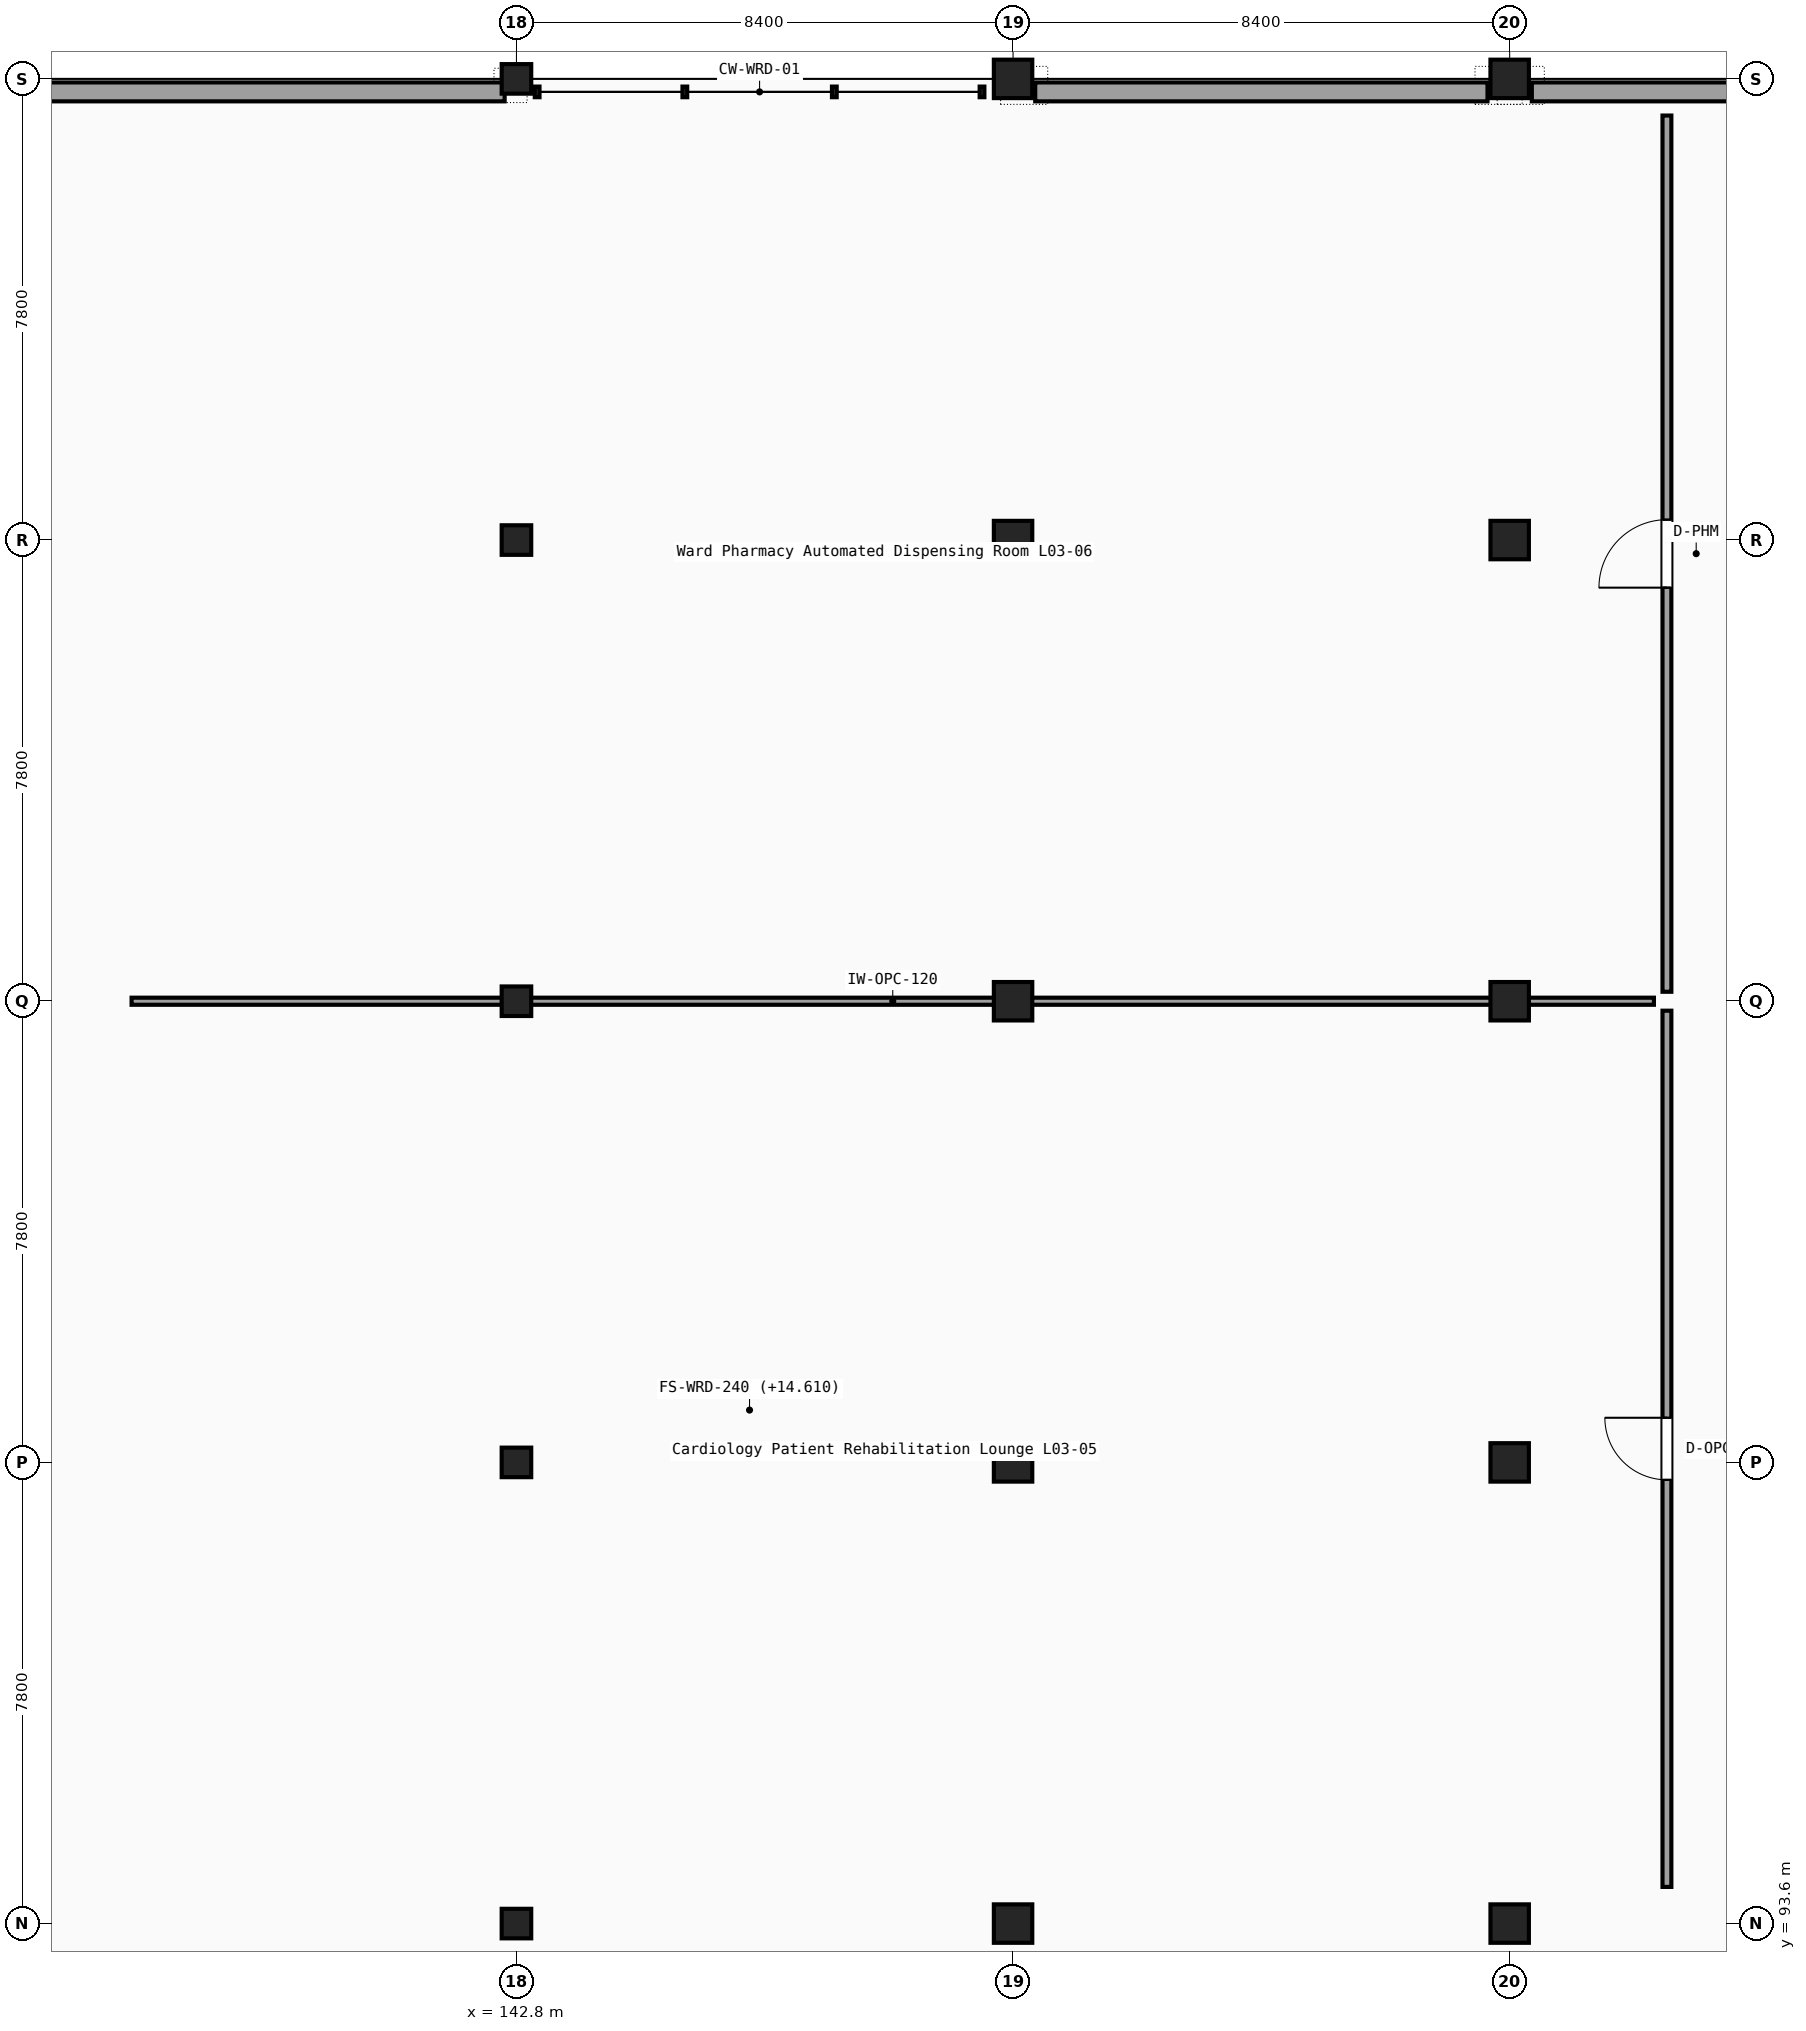
"""IFC4 building model, lengths in metres.
Left out: names, types, materials, properties, quantities, classifications, styles, units other than length and angle.
Written with IfcOpenShell. Run it as: python <this file> out.ifc"""

import sys

from ifc_helpers import new_model, si_unit, direction, frame, frame_2d, origin, origin_2d, place, context, subcontext, project, spatial, rectangle, i_section, extrude, element, fill, save


model = new_model("IFC4")
c1 = context("Model", 3, precision=1e-05, world=origin(), true_north=direction((0.0, 1.0)))
c2 = subcontext(c1, "Body", "Model", "MODEL_VIEW")
j1 = project(units=[si_unit("LENGTHUNIT", "METRE"), si_unit("PLANEANGLEUNIT", "RADIAN")], contexts=[c1])
p1 = place(None, origin())
s1 = spatial("IfcSite", under=j1, at=p1, CompositionType="ELEMENT")
p2 = place(p1, origin())
s2 = spatial("IfcBuilding", under=s1, at=p2, CompositionType="ELEMENT")
p3 = place(p2, frame((0.0, 0.0, 14.85)))
s3 = spatial("IfcBuildingStorey", under=s2, at=p3, CompositionType="ELEMENT", Elevation=14.85)
for number, where, z_axis, x_axis in (
    (1, (142.8, 93.6, 0.0), (0.0, 0.0, 1.0), (1.0, 0.0, 0.0)),
    (2, (142.8, 101.4, 0.0), (0.0, 0.0, 1.0), (1.0, 0.0, 0.0)),
    (3, (142.8, 109.2, 0.0), (0.0, 0.0, 1.0), (1.0, 0.0, 0.0)),
    (4, (142.8, 117.0, 0.0), (0.0, 0.0, 1.0), (1.0, 0.0, 0.0)),
    (5, (142.8, 124.8, 0.0), (0.0, 0.0, 1.0), (1.0, 0.0, 0.0)),
):
    element("IfcColumn", number, at=place(p3, frame(where, z_axis=z_axis, x_axis=x_axis)), inside=s3, PredefinedType="COLUMN", context=c2, shape_type="SweptSolid", body=[
        extrude(i_section(OverallWidth=0.3, OverallDepth=0.5, WebThickness=0.014, FlangeThickness=0.028, FilletRadius=0.027, at=origin_2d()), origin(), (0.0, 0.0, 1.0), 4.05),
    ])
for number, where, z_axis, x_axis in (
    (6, (151.2, 93.6, 0.0), (0.0, 0.0, 1.0), (1.0, 0.0, 0.0)),
    (7, (151.2, 101.4, 0.0), (0.0, 0.0, 1.0), (1.0, 0.0, 0.0)),
    (8, (151.2, 109.2, 0.0), (0.0, 0.0, 1.0), (1.0, 0.0, 0.0)),
    (9, (151.2, 117.0, 0.0), (0.0, 0.0, 1.0), (1.0, 0.0, 0.0)),
    (10, (151.2, 124.8, 0.0), (0.0, 0.0, 1.0), (1.0, 0.0, 0.0)),
    (11, (159.6, 93.6, 0.0), (0.0, 0.0, 1.0), (1.0, 0.0, 0.0)),
    (12, (159.6, 101.4, 0.0), (0.0, 0.0, 1.0), (1.0, 0.0, 0.0)),
    (13, (159.6, 109.2, 0.0), (0.0, 0.0, 1.0), (1.0, 0.0, 0.0)),
    (14, (159.6, 117.0, 0.0), (0.0, 0.0, 1.0), (1.0, 0.0, 0.0)),
    (15, (159.6, 124.8, 0.0), (0.0, 0.0, 1.0), (1.0, 0.0, 0.0)),
):
    element("IfcColumn", number, at=place(p3, frame(where, z_axis=z_axis, x_axis=x_axis)), inside=s3, PredefinedType="COLUMN", context=c2, shape_type="SweptSolid", body=[
        extrude(rectangle(XDim=0.65, YDim=0.65, at=origin_2d()), origin(), (0.0, 0.0, 1.0), 4.05),
    ])
p4 = place(p3, frame((134.6, 124.58, 0.0), z_axis=(0.0, 0.0, 1.0), x_axis=(1.0, 0.0, 0.0)))
e16 = element("IfcWall", 16, at=p4, inside=s3, PredefinedType="SOLIDWALL", context=c2, shape_type="SweptSolid", body=[
    extrude(rectangle(XDim=8.0, YDim=0.32, at=frame_2d((4.0, 0.0))), origin(), (0.0, 0.0, 1.0), 3.45),
])
p5 = place(p3, frame((151.575, 124.58, 0.0), z_axis=(0.0, 0.0, 1.0), x_axis=(1.0, 0.0, 0.0)))
e17 = element("IfcWall", 17, at=p5, inside=s3, PredefinedType="SOLIDWALL", context=c2, shape_type="SweptSolid", body=[
    extrude(rectangle(XDim=7.65, YDim=0.32, at=frame_2d((3.825, 0.0))), origin(), (0.0, 0.0, 1.0), 3.45),
])
p6 = place(p3, frame((159.975, 124.58, 0.0), z_axis=(0.0, 0.0, 1.0), x_axis=(1.0, 0.0, 0.0)))
e18 = element("IfcWall", 18, at=p6, inside=s3, PredefinedType="SOLIDWALL", context=c2, shape_type="SweptSolid", body=[
    extrude(rectangle(XDim=7.825, YDim=0.32, at=frame_2d((3.913, 0.0))), origin(), (0.0, 0.0, 1.0), 3.45),
])
p7 = place(p6, frame((3.337, 0.0, 0.7)))
e19 = element("IfcOpeningElement", 19, at=p7, cuts=e18, PredefinedType="OPENING", context=c2, shape_type="SweptSolid", body=[
    extrude(rectangle(XDim=1.15, YDim=1.95, at=frame_2d((0.575, 0.975))), frame((0.0, 0.17, 0.0), z_axis=(0.0, -1.0, 0.0), x_axis=(1.0, 0.0, 0.0)), (0.0, 0.0, 1.0), 0.34),
])
p8 = place(p3, frame((162.26, 94.22, 0.0), z_axis=(0.0, 0.0, 1.0), x_axis=(0.0, 1.0, 0.0)))
e20 = element("IfcWall", 20, at=p8, inside=s3, PredefinedType="PARTITIONING", context=c2, shape_type="SweptSolid", body=[
    extrude(rectangle(XDim=14.82, YDim=0.15, at=frame_2d((7.41, 0.0))), origin(), (0.0, 0.0, 1.0), 3.35),
])
p9 = place(p8, frame((6.885, 0.0, 0.0)))
e21 = element("IfcOpeningElement", 21, at=p9, cuts=e20, PredefinedType="OPENING", context=c2, shape_type="SweptSolid", body=[
    extrude(rectangle(XDim=1.05, YDim=2.15, at=frame_2d((0.525, 1.075))), frame((0.0, 0.085, 0.0), z_axis=(0.0, -1.0, 0.0), x_axis=(1.0, 0.0, 0.0)), (0.0, 0.0, 1.0), 0.17),
])
p10 = place(p3, frame((136.29, 109.2, 0.0), z_axis=(0.0, 0.0, 1.0), x_axis=(1.0, 0.0, 0.0)))
e22 = element("IfcWall", 22, at=p10, inside=s3, PredefinedType="PARTITIONING", context=c2, shape_type="SweptSolid", body=[
    extrude(rectangle(XDim=25.75, YDim=0.12, at=frame_2d((12.875, 0.0))), origin(), (0.0, 0.0, 1.0), 3.35),
])
p11 = place(p3, frame((162.26, 109.36, 0.0), z_axis=(0.0, 0.0, 1.0), x_axis=(0.0, 1.0, 0.0)))
e23 = element("IfcWall", 23, at=p11, inside=s3, PredefinedType="PARTITIONING", context=c2, shape_type="SweptSolid", body=[
    extrude(rectangle(XDim=14.82, YDim=0.15, at=frame_2d((7.41, 0.0))), origin(), (0.0, 0.0, 1.0), 3.35),
])
p12 = place(p11, frame((6.835, 0.0, 0.0)))
e24 = element("IfcOpeningElement", 24, at=p12, cuts=e23, PredefinedType="OPENING", context=c2, shape_type="SweptSolid", body=[
    extrude(rectangle(XDim=1.15, YDim=2.15, at=frame_2d((0.575, 1.075))), frame((0.0, 0.085, 0.0), z_axis=(0.0, -1.0, 0.0), x_axis=(1.0, 0.0, 0.0)), (0.0, 0.0, 1.0), 0.17),
])
p13 = place(p9, origin())
e25 = element("IfcDoor", 25, at=p13, inside=s3, OperationType="SINGLE_SWING_RIGHT", PredefinedType="DOOR", context=c2, shape_type="SweptSolid", body=[
    extrude(rectangle(XDim=1.05, YDim=2.15, at=frame_2d((0.525, 1.075))), frame((0.0, 0.025, 0.0), z_axis=(0.0, -1.0, 0.0), x_axis=(1.0, 0.0, 0.0)), (0.0, 0.0, 1.0), 0.05),
])
fill(e21, e25)
p14 = place(p12, origin())
e26 = element("IfcDoor", 26, at=p14, inside=s3, OperationType="SINGLE_SWING_LEFT", PredefinedType="DOOR", context=c2, shape_type="SweptSolid", body=[
    extrude(rectangle(XDim=1.15, YDim=2.15, at=frame_2d((0.575, 1.075))), frame((0.0, 0.025, 0.0), z_axis=(0.0, -1.0, 0.0), x_axis=(1.0, 0.0, 0.0)), (0.0, 0.0, 1.0), 0.05),
])
fill(e24, e26)
save(model, sys.argv[1])
